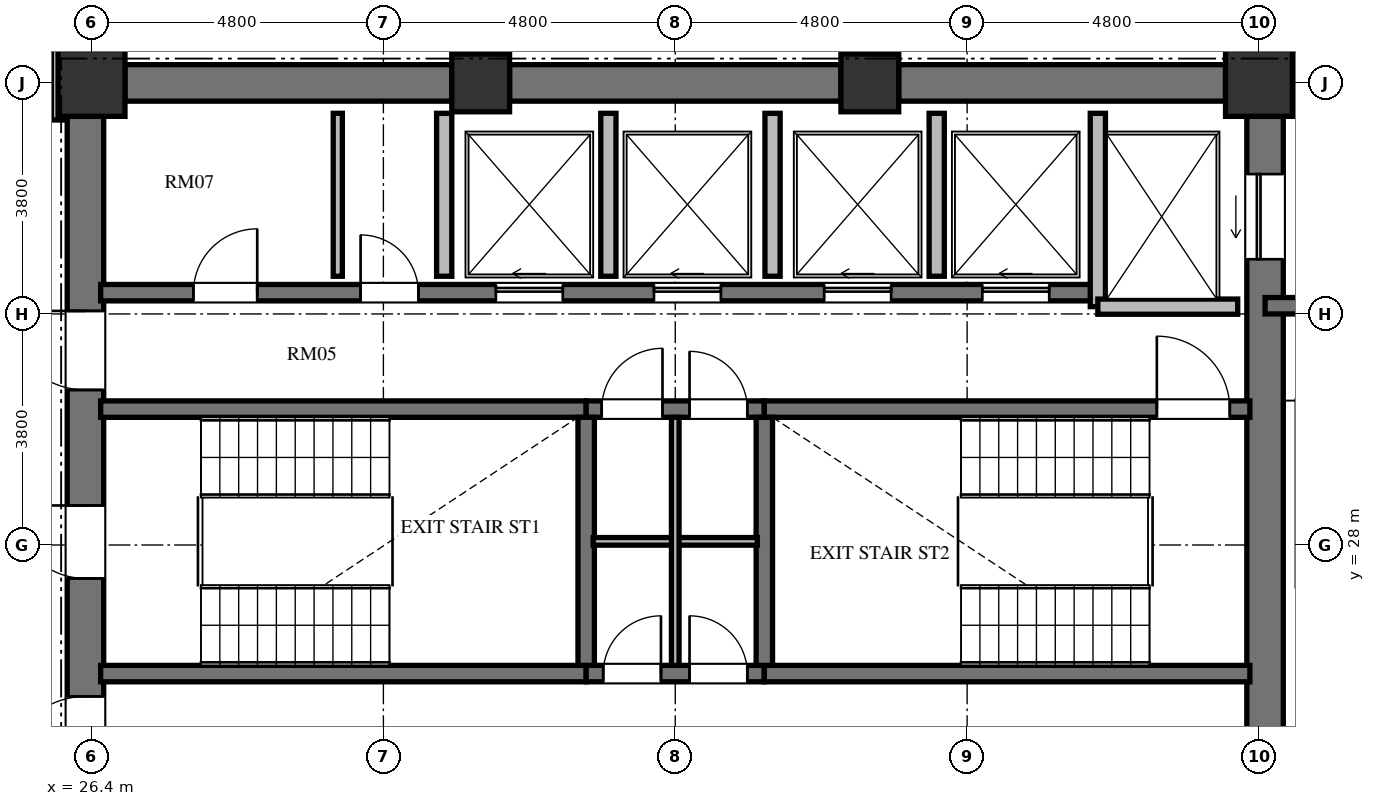
"""IFC4 building model, lengths in metres.
Left out: names, types, materials, properties, quantities, classifications, styles, units other than length and angle.
Written with IfcOpenShell. Run it as: python <this file> out.ifc"""

import sys

from ifc_helpers import new_model, si_unit, direction, frame, frame_2d, origin, origin_2d, place, context, subcontext, project, spatial, rectangle, extrude, element, fill, save


model = new_model("IFC4")
c1 = context("Model", 3, precision=1e-05, world=origin(), true_north=direction((0.0, 1.0)))
c2 = subcontext(c1, "Body", "Model", "MODEL_VIEW")
j1 = project(units=[si_unit("LENGTHUNIT", "METRE"), si_unit("PLANEANGLEUNIT", "RADIAN")], contexts=[c1])
p1 = place(None, origin())
s1 = spatial("IfcSite", under=j1, at=p1, CompositionType="ELEMENT")
p2 = place(p1, origin())
s2 = spatial("IfcBuilding", under=s1, at=p2, CompositionType="ELEMENT")
p3 = place(p2, frame((0.0, 0.0, 185.712)))
s3 = spatial("IfcBuildingStorey", under=s2, at=p3, CompositionType="ELEMENT", Elevation=185.712)
p4 = place(p3, frame((45.6, 35.6, 0.0), z_axis=(0.0, 0.0, 1.0), x_axis=(1.0, 0.0, 0.0)))
e1 = element("IfcColumn", 1, at=p4, inside=s3, PredefinedType="COLUMN", context=c2, shape_type="SweptSolid", body=[
    extrude(rectangle(XDim=1.1, YDim=1.1, at=origin_2d()), origin(), (0.0, 0.0, 1.0), 3.648),
])
for number, where, z_axis, x_axis in (
    (2, (39.2, 35.6, 0.0), (0.0, 0.0, 1.0), (1.0, 0.0, 0.0)),
    (3, (32.8, 35.6, 0.0), (0.0, 0.0, 1.0), (1.0, 0.0, 0.0)),
):
    element("IfcColumn", number, at=place(p3, frame(where, z_axis=z_axis, x_axis=x_axis)), inside=s3, PredefinedType="COLUMN", context=c2, shape_type="SweptSolid", body=[
        extrude(rectangle(XDim=0.95, YDim=0.95, at=origin_2d()), origin(), (0.0, 0.0, 1.0), 3.648),
    ])
p5 = place(p3, frame((26.4, 35.6, 0.0), z_axis=(0.0, 0.0, 1.0), x_axis=(1.0, 0.0, 0.0)))
e4 = element("IfcColumn", 4, at=p5, inside=s3, PredefinedType="COLUMN", context=c2, shape_type="SweptSolid", body=[
    extrude(rectangle(XDim=1.1, YDim=1.1, at=origin_2d()), origin(), (0.0, 0.0, 1.0), 3.648),
])
p6 = place(p3, frame((26.3, 20.95, 0.0), z_axis=(0.0, 0.0, 1.0), x_axis=(0.0, 1.0, 0.0)))
e5 = element("IfcWall", 5, at=p6, inside=s3, PredefinedType="SHEAR", context=c2, shape_type="SweptSolid", body=[
    extrude(rectangle(XDim=14.1, YDim=0.6, at=frame_2d((7.05, 0.0))), origin(), (0.0, 0.0, 1.0), 3.648),
])
p7 = place(p6, frame((6.5, 0.0, 0.0)))
e6 = element("IfcOpeningElement", 6, at=p7, cuts=e5, PredefinedType="OPENING", context=c2, shape_type="SweptSolid", body=[
    extrude(rectangle(XDim=1.2, YDim=2.15, at=frame_2d((0.6, 1.075))), frame((0.0, 0.31, 0.0), z_axis=(0.0, -1.0, 0.0), x_axis=(1.0, 0.0, 0.0)), (0.0, 0.0, 1.0), 0.62),
])
p8 = place(p6, frame((9.6, 0.0, 0.0)))
e7 = element("IfcOpeningElement", 7, at=p8, cuts=e5, PredefinedType="OPENING", context=c2, shape_type="SweptSolid", body=[
    extrude(rectangle(XDim=1.3, YDim=2.2, at=frame_2d((0.65, 1.1))), frame((0.0, 0.31, 0.0), z_axis=(0.0, -1.0, 0.0), x_axis=(1.0, 0.0, 0.0)), (0.0, 0.0, 1.0), 0.62),
])
p9 = place(p6, frame((3.26, 0.0, 0.0)))
e8 = element("IfcOpeningElement", 8, at=p9, cuts=e5, PredefinedType="OPENING", context=c2, shape_type="SweptSolid", body=[
    extrude(rectangle(XDim=1.3, YDim=2.2, at=frame_2d((0.65, 1.1))), frame((0.0, 0.31, 0.0), z_axis=(0.0, -1.0, 0.0), x_axis=(1.0, 0.0, 0.0)), (0.0, 0.0, 1.0), 0.62),
])
p10 = place(p3, frame((45.7, 20.95, 0.0), z_axis=(0.0, 0.0, 1.0), x_axis=(0.0, 1.0, 0.0)))
e9 = element("IfcWall", 9, at=p10, inside=s3, PredefinedType="SHEAR", context=c2, shape_type="SweptSolid", body=[
    extrude(rectangle(XDim=14.1, YDim=0.6, at=frame_2d((7.05, 0.0))), origin(), (0.0, 0.0, 1.0), 3.648),
])
p11 = place(p10, frame((11.75, 0.0, 0.0)))
e10 = element("IfcOpeningElement", 10, at=p11, cuts=e9, PredefinedType="OPENING", context=c2, shape_type="SweptSolid", body=[
    extrude(rectangle(XDim=1.4, YDim=2.3, at=frame_2d((0.7, 1.15))), frame((0.0, 0.31, 0.0), z_axis=(0.0, -1.0, 0.0), x_axis=(1.0, 0.0, 0.0)), (0.0, 0.0, 1.0), 0.62),
])
p12 = place(p10, frame((0.95, 0.0, 0.0)))
e11 = element("IfcOpeningElement", 11, at=p12, cuts=e9, PredefinedType="OPENING", context=c2, shape_type="SweptSolid", body=[
    extrude(rectangle(XDim=1.4, YDim=2.3, at=frame_2d((0.7, 1.15))), frame((0.0, 0.31, 0.0), z_axis=(0.0, -1.0, 0.0), x_axis=(1.0, 0.0, 0.0)), (0.0, 0.0, 1.0), 0.62),
])
p13 = place(p3, frame((26.95, 35.6, 0.0), z_axis=(0.0, 0.0, 1.0), x_axis=(1.0, 0.0, 0.0)))
e12 = element("IfcWall", 12, at=p13, inside=s3, PredefinedType="SHEAR", context=c2, shape_type="SweptSolid", body=[
    extrude(rectangle(XDim=5.375, YDim=0.6, at=frame_2d((2.688, 0.0))), origin(), (0.0, 0.0, 1.0), 3.648),
])
p14 = place(p3, frame((33.275, 35.6, 0.0), z_axis=(0.0, 0.0, 1.0), x_axis=(1.0, 0.0, 0.0)))
e13 = element("IfcWall", 13, at=p14, inside=s3, PredefinedType="SHEAR", context=c2, shape_type="SweptSolid", body=[
    extrude(rectangle(XDim=5.45, YDim=0.6, at=frame_2d((2.725, 0.0))), origin(), (0.0, 0.0, 1.0), 3.648),
])
p15 = place(p3, frame((39.675, 35.6, 0.0), z_axis=(0.0, 0.0, 1.0), x_axis=(1.0, 0.0, 0.0)))
e14 = element("IfcWall", 14, at=p15, inside=s3, PredefinedType="SHEAR", context=c2, shape_type="SweptSolid", body=[
    extrude(rectangle(XDim=5.375, YDim=0.6, at=frame_2d((2.688, 0.0))), origin(), (0.0, 0.0, 1.0), 3.648),
])
p16 = place(p3, frame((26.55, 30.235, 0.0), z_axis=(0.0, 0.0, 1.0), x_axis=(1.0, 0.0, 0.0)))
e15 = element("IfcWall", 15, at=p16, inside=s3, PredefinedType="SHEAR", context=c2, shape_type="SweptSolid", body=[
    extrude(rectangle(XDim=7.985, YDim=0.27, at=frame_2d((3.992, 0.0))), origin(), (0.0, 0.0, 1.0), 3.648),
])
p17 = place(p3, frame((34.535, 30.235, 0.0), z_axis=(0.0, 0.0, 1.0), x_axis=(1.0, 0.0, 0.0)))
e16 = element("IfcWall", 16, at=p17, inside=s3, PredefinedType="SHEAR", context=c2, shape_type="SweptSolid", body=[
    extrude(rectangle(XDim=2.93, YDim=0.27, at=frame_2d((1.465, 0.0))), origin(), (0.0, 0.0, 1.0), 3.648),
])
p18 = place(p17, frame((0.255, 0.0, 0.0)))
e17 = element("IfcOpeningElement", 17, at=p18, cuts=e16, PredefinedType="OPENING", context=c2, shape_type="SweptSolid", body=[
    extrude(rectangle(XDim=1.0, YDim=2.1, at=frame_2d((0.5, 1.05))), frame((0.0, 0.145, 0.0), z_axis=(0.0, -1.0, 0.0), x_axis=(1.0, 0.0, 0.0)), (0.0, 0.0, 1.0), 0.29),
])
p19 = place(p17, frame((1.7, 0.0, 0.0)))
e18 = element("IfcOpeningElement", 18, at=p19, cuts=e16, PredefinedType="OPENING", context=c2, shape_type="SweptSolid", body=[
    extrude(rectangle(XDim=0.95, YDim=2.1, at=frame_2d((0.475, 1.05))), frame((0.0, 0.145, 0.0), z_axis=(0.0, -1.0, 0.0), x_axis=(1.0, 0.0, 0.0)), (0.0, 0.0, 1.0), 0.29),
])
p20 = place(p3, frame((37.465, 30.235, 0.0), z_axis=(0.0, 0.0, 1.0), x_axis=(1.0, 0.0, 0.0)))
e19 = element("IfcWall", 19, at=p20, inside=s3, PredefinedType="SHEAR", context=c2, shape_type="SweptSolid", body=[
    extrude(rectangle(XDim=7.985, YDim=0.27, at=frame_2d((3.992, 0.0))), origin(), (0.0, 0.0, 1.0), 3.648),
])
p21 = place(p20, frame((6.455, 0.0, 0.0)))
e20 = element("IfcOpeningElement", 20, at=p21, cuts=e19, PredefinedType="OPENING", context=c2, shape_type="SweptSolid", body=[
    extrude(rectangle(XDim=1.2, YDim=2.15, at=frame_2d((0.6, 1.075))), frame((0.0, 0.145, 0.0), z_axis=(0.0, -1.0, 0.0), x_axis=(1.0, 0.0, 0.0)), (0.0, 0.0, 1.0), 0.29),
])
p22 = place(p3, frame((26.55, 25.885, 0.0), z_axis=(0.0, 0.0, 1.0), x_axis=(1.0, 0.0, 0.0)))
e21 = element("IfcWall", 21, at=p22, inside=s3, PredefinedType="SHEAR", context=c2, shape_type="SweptSolid", body=[
    extrude(rectangle(XDim=7.985, YDim=0.27, at=frame_2d((3.992, 0.0))), origin(), (0.0, 0.0, 1.0), 3.648),
])
p23 = place(p3, frame((34.535, 25.885, 0.0), z_axis=(0.0, 0.0, 1.0), x_axis=(1.0, 0.0, 0.0)))
e22 = element("IfcWall", 22, at=p23, inside=s3, PredefinedType="SHEAR", context=c2, shape_type="SweptSolid", body=[
    extrude(rectangle(XDim=2.93, YDim=0.27, at=frame_2d((1.465, 0.0))), origin(), (0.0, 0.0, 1.0), 3.648),
])
p24 = place(p23, frame((0.28, 0.0, 0.0)))
e23 = element("IfcOpeningElement", 23, at=p24, cuts=e22, PredefinedType="OPENING", context=c2, shape_type="SweptSolid", body=[
    extrude(rectangle(XDim=0.95, YDim=2.1, at=frame_2d((0.475, 1.05))), frame((0.0, 0.145, 0.0), z_axis=(0.0, -1.0, 0.0), x_axis=(1.0, 0.0, 0.0)), (0.0, 0.0, 1.0), 0.29),
])
p25 = place(p23, frame((1.7, 0.0, 0.0)))
e24 = element("IfcOpeningElement", 24, at=p25, cuts=e22, PredefinedType="OPENING", context=c2, shape_type="SweptSolid", body=[
    extrude(rectangle(XDim=0.95, YDim=2.1, at=frame_2d((0.475, 1.05))), frame((0.0, 0.145, 0.0), z_axis=(0.0, -1.0, 0.0), x_axis=(1.0, 0.0, 0.0)), (0.0, 0.0, 1.0), 0.29),
])
p26 = place(p3, frame((37.465, 25.885, 0.0), z_axis=(0.0, 0.0, 1.0), x_axis=(1.0, 0.0, 0.0)))
e25 = element("IfcWall", 25, at=p26, inside=s3, PredefinedType="SHEAR", context=c2, shape_type="SweptSolid", body=[
    extrude(rectangle(XDim=7.985, YDim=0.27, at=frame_2d((3.992, 0.0))), origin(), (0.0, 0.0, 1.0), 3.648),
])
for number, where, z_axis, x_axis in (
    (26, (34.535, 26.02, 0.0), (0.0, 0.0, 1.0), (0.0, 1.0, 0.0)),
    (27, (37.465, 26.02, 0.0), (0.0, 0.0, 1.0), (0.0, 1.0, 0.0)),
):
    element("IfcWall", number, at=place(p3, frame(where, z_axis=z_axis, x_axis=x_axis)), inside=s3, PredefinedType="SHEAR", context=c2, shape_type="SweptSolid", body=[
        extrude(rectangle(XDim=4.08, YDim=0.27, at=frame_2d((2.04, 0.0))), origin(), (0.0, 0.0, 1.0), 3.648),
    ])
p27 = place(p3, frame((34.65, 28.06, 0.0), z_axis=(0.0, 0.0, 1.0), x_axis=(1.0, 0.0, 0.0)))
e28 = element("IfcWall", 28, at=p27, inside=s3, PredefinedType="PARTITIONING", context=c2, shape_type="SweptSolid", body=[
    extrude(rectangle(XDim=2.7, YDim=0.125, at=frame_2d((1.35, 0.0))), origin(), (0.0, 0.0, 1.0), 3.198),
])
p28 = place(p3, frame((36.0, 26.02, 0.0), z_axis=(0.0, 0.0, 1.0), x_axis=(0.0, 1.0, 0.0)))
e29 = element("IfcWall", 29, at=p28, inside=s3, PredefinedType="PARTITIONING", context=c2, shape_type="SweptSolid", body=[
    extrude(rectangle(XDim=4.08, YDim=0.125, at=frame_2d((2.04, 0.0))), origin(), (0.0, 0.0, 1.0), 3.198),
])
p29 = place(p3, frame((26.55, 32.15, 0.0), z_axis=(0.0, 0.0, 1.0), x_axis=(1.0, 0.0, 0.0)))
e30 = element("IfcWall", 30, at=p29, inside=s3, PredefinedType="SHEAR", context=c2, shape_type="SweptSolid", body=[
    extrude(rectangle(XDim=16.4, YDim=0.27, at=frame_2d((8.2, 0.0))), origin(), (0.0, 0.0, 1.0), 3.648),
])
p30 = place(p29, frame((1.525, 0.0, 0.0)))
e31 = element("IfcOpeningElement", 31, at=p30, cuts=e30, PredefinedType="OPENING", context=c2, shape_type="SweptSolid", body=[
    extrude(rectangle(XDim=1.05, YDim=2.15, at=frame_2d((0.525, 1.075))), frame((0.0, 0.145, 0.0), z_axis=(0.0, -1.0, 0.0), x_axis=(1.0, 0.0, 0.0)), (0.0, 0.0, 1.0), 0.29),
])
p31 = place(p29, frame((4.275, 0.0, 0.0)))
e32 = element("IfcOpeningElement", 32, at=p31, cuts=e30, PredefinedType="OPENING", context=c2, shape_type="SweptSolid", body=[
    extrude(rectangle(XDim=0.95, YDim=2.1, at=frame_2d((0.475, 1.05))), frame((0.0, 0.145, 0.0), z_axis=(0.0, -1.0, 0.0), x_axis=(1.0, 0.0, 0.0)), (0.0, 0.0, 1.0), 0.29),
])
p32 = place(p29, frame((6.5, 0.0, 0.0)))
e33 = element("IfcOpeningElement", 33, at=p32, cuts=e30, PredefinedType="OPENING", context=c2, shape_type="SweptSolid", body=[
    extrude(rectangle(XDim=1.1, YDim=2.2, at=frame_2d((0.55, 1.1))), frame((0.0, 0.145, 0.0), z_axis=(0.0, -1.0, 0.0), x_axis=(1.0, 0.0, 0.0)), (0.0, 0.0, 1.0), 0.29),
])
p33 = place(p29, frame((9.1, 0.0, 0.0)))
e34 = element("IfcOpeningElement", 34, at=p33, cuts=e30, PredefinedType="OPENING", context=c2, shape_type="SweptSolid", body=[
    extrude(rectangle(XDim=1.1, YDim=2.2, at=frame_2d((0.55, 1.1))), frame((0.0, 0.145, 0.0), z_axis=(0.0, -1.0, 0.0), x_axis=(1.0, 0.0, 0.0)), (0.0, 0.0, 1.0), 0.29),
])
p34 = place(p29, frame((11.9, 0.0, 0.0)))
e35 = element("IfcOpeningElement", 35, at=p34, cuts=e30, PredefinedType="OPENING", context=c2, shape_type="SweptSolid", body=[
    extrude(rectangle(XDim=1.1, YDim=2.2, at=frame_2d((0.55, 1.1))), frame((0.0, 0.145, 0.0), z_axis=(0.0, -1.0, 0.0), x_axis=(1.0, 0.0, 0.0)), (0.0, 0.0, 1.0), 0.29),
])
p35 = place(p29, frame((14.5, 0.0, 0.0)))
e36 = element("IfcOpeningElement", 36, at=p35, cuts=e30, PredefinedType="OPENING", context=c2, shape_type="SweptSolid", body=[
    extrude(rectangle(XDim=1.1, YDim=2.2, at=frame_2d((0.55, 1.1))), frame((0.0, 0.145, 0.0), z_axis=(0.0, -1.0, 0.0), x_axis=(1.0, 0.0, 0.0)), (0.0, 0.0, 1.0), 0.29),
])
p36 = place(p3, frame((42.95, 31.92, 0.0), z_axis=(0.0, 0.0, 1.0), x_axis=(0.0, 1.0, 0.0)))
e37 = element("IfcWall", 37, at=p36, inside=s3, PredefinedType="SOLIDWALL", context=c2, shape_type="SweptSolid", body=[
    extrude(rectangle(XDim=3.18, YDim=0.25, at=frame_2d((1.59, 0.0))), origin(), (0.0, 0.0, 1.0), 3.198),
])
p37 = place(p3, frame((42.95, 31.92, 0.0), z_axis=(0.0, 0.0, 1.0), x_axis=(1.0, 0.0, 0.0)))
e38 = element("IfcWall", 38, at=p37, inside=s3, PredefinedType="SOLIDWALL", context=c2, shape_type="SweptSolid", body=[
    extrude(rectangle(XDim=2.3, YDim=0.25, at=frame_2d((1.15, 0.0))), origin(), (0.0, 0.0, 1.0), 3.198),
])
for number, where, z_axis, x_axis in (
    (39, (32.2, 32.42, 0.0), (0.0, 0.0, 1.0), (0.0, 1.0, 0.0)),
    (40, (34.9, 32.42, 0.0), (0.0, 0.0, 1.0), (0.0, 1.0, 0.0)),
    (41, (37.6, 32.42, 0.0), (0.0, 0.0, 1.0), (0.0, 1.0, 0.0)),
    (42, (40.3, 32.42, 0.0), (0.0, 0.0, 1.0), (0.0, 1.0, 0.0)),
):
    element("IfcWall", number, at=place(p3, frame(where, z_axis=z_axis, x_axis=x_axis)), inside=s3, PredefinedType="SOLIDWALL", context=c2, shape_type="SweptSolid", body=[
        extrude(rectangle(XDim=2.68, YDim=0.25, at=frame_2d((1.34, 0.0))), origin(), (0.0, 0.0, 1.0), 3.198),
    ])
p38 = place(p3, frame((30.45, 32.42, 0.0), z_axis=(0.0, 0.0, 1.0), x_axis=(0.0, 1.0, 0.0)))
e43 = element("IfcWall", 43, at=p38, inside=s3, PredefinedType="PARTITIONING", context=c2, shape_type="SweptSolid", body=[
    extrude(rectangle(XDim=2.68, YDim=0.15, at=frame_2d((1.34, 0.0))), origin(), (0.0, 0.0, 1.0), 3.198),
])
p39 = place(p3, frame((46.0, 35.98, 0.0), z_axis=(0.0, 0.0, 1.0), x_axis=(1.0, 0.0, 0.0)))
e44 = element("IfcWall", 44, at=p39, inside=s3, PredefinedType="SHEAR", context=c2, shape_type="SweptSolid", body=[
    extrude(rectangle(XDim=4.55, YDim=0.27, at=frame_2d((2.275, 0.0))), origin(), (0.0, 0.0, 1.0), 3.648),
])
p40 = place(p3, frame((45.7, 31.935, 0.0), z_axis=(0.0, 0.0, 1.0), x_axis=(1.0, 0.0, 0.0)))
e45 = element("IfcWall", 45, at=p40, inside=s3, PredefinedType="SHEAR", context=c2, shape_type="SweptSolid", body=[
    extrude(rectangle(XDim=4.715, YDim=0.27, at=frame_2d((2.357, 0.0))), origin(), (0.0, 0.0, 1.0), 3.648),
])
p41 = place(p3, frame((25.83, 36.21, 0.0), z_axis=(0.0, 0.0, 1.0), x_axis=(0.0, -1.0, 0.0)))
e46 = element("IfcWall", 46, at=p41, inside=s3, PredefinedType="PARTITIONING", context=c2, shape_type="SweptSolid", body=[
    extrude(rectangle(XDim=1.22, YDim=0.18, at=frame_2d((0.61, 0.0))), origin(), (0.0, 0.0, 1.0), 3.198),
])
p42 = place(p7, origin())
e47 = element("IfcDoor", 47, at=p42, inside=s3, OperationType="SINGLE_SWING_RIGHT", PredefinedType="DOOR", context=c2, shape_type="SweptSolid", body=[
    extrude(rectangle(XDim=1.2, YDim=2.15, at=frame_2d((0.6, 1.075))), frame((0.0, 0.025, 0.0), z_axis=(0.0, -1.0, 0.0), x_axis=(1.0, 0.0, 0.0)), (0.0, 0.0, 1.0), 0.05),
])
fill(e6, e47)
p43 = place(p21, origin())
e48 = element("IfcDoor", 48, at=p43, inside=s3, OperationType="SINGLE_SWING_LEFT", PredefinedType="DOOR", context=c2, shape_type="SweptSolid", body=[
    extrude(rectangle(XDim=1.2, YDim=2.15, at=frame_2d((0.6, 1.075))), frame((0.0, 0.025, 0.0), z_axis=(0.0, -1.0, 0.0), x_axis=(1.0, 0.0, 0.0)), (0.0, 0.0, 1.0), 0.05),
])
fill(e20, e48)
p44 = place(p24, origin())
e49 = element("IfcDoor", 49, at=p44, inside=s3, OperationType="SINGLE_SWING_RIGHT", PredefinedType="DOOR", context=c2, shape_type="SweptSolid", body=[
    extrude(rectangle(XDim=0.95, YDim=2.1, at=frame_2d((0.475, 1.05))), frame((0.0, 0.025, 0.0), z_axis=(0.0, -1.0, 0.0), x_axis=(1.0, 0.0, 0.0)), (0.0, 0.0, 1.0), 0.05),
])
fill(e23, e49)
p45 = place(p25, origin())
e50 = element("IfcDoor", 50, at=p45, inside=s3, OperationType="SINGLE_SWING_LEFT", PredefinedType="DOOR", context=c2, shape_type="SweptSolid", body=[
    extrude(rectangle(XDim=0.95, YDim=2.1, at=frame_2d((0.475, 1.05))), frame((0.0, 0.025, 0.0), z_axis=(0.0, -1.0, 0.0), x_axis=(1.0, 0.0, 0.0)), (0.0, 0.0, 1.0), 0.05),
])
fill(e24, e50)
p46 = place(p18, origin())
e51 = element("IfcDoor", 51, at=p46, inside=s3, OperationType="SINGLE_SWING_RIGHT", PredefinedType="DOOR", context=c2, shape_type="SweptSolid", body=[
    extrude(rectangle(XDim=1.0, YDim=2.1, at=frame_2d((0.5, 1.05))), frame((0.0, 0.025, 0.0), z_axis=(0.0, -1.0, 0.0), x_axis=(1.0, 0.0, 0.0)), (0.0, 0.0, 1.0), 0.05),
])
fill(e17, e51)
p47 = place(p19, origin())
e52 = element("IfcDoor", 52, at=p47, inside=s3, OperationType="SINGLE_SWING_LEFT", PredefinedType="DOOR", context=c2, shape_type="SweptSolid", body=[
    extrude(rectangle(XDim=0.95, YDim=2.1, at=frame_2d((0.475, 1.05))), frame((0.0, 0.025, 0.0), z_axis=(0.0, -1.0, 0.0), x_axis=(1.0, 0.0, 0.0)), (0.0, 0.0, 1.0), 0.05),
])
fill(e18, e52)
p48 = place(p8, origin())
e53 = element("IfcDoor", 53, at=p48, inside=s3, OperationType="SINGLE_SWING_RIGHT", PredefinedType="DOOR", context=c2, shape_type="SweptSolid", body=[
    extrude(rectangle(XDim=1.3, YDim=2.2, at=frame_2d((0.65, 1.1))), frame((0.0, 0.025, 0.0), z_axis=(0.0, -1.0, 0.0), x_axis=(1.0, 0.0, 0.0)), (0.0, 0.0, 1.0), 0.05),
])
fill(e7, e53)
p49 = place(p9, origin())
e54 = element("IfcDoor", 54, at=p49, inside=s3, OperationType="SINGLE_SWING_LEFT", PredefinedType="DOOR", context=c2, shape_type="SweptSolid", body=[
    extrude(rectangle(XDim=1.3, YDim=2.2, at=frame_2d((0.65, 1.1))), frame((0.0, 0.025, 0.0), z_axis=(0.0, -1.0, 0.0), x_axis=(1.0, 0.0, 0.0)), (0.0, 0.0, 1.0), 0.05),
])
fill(e8, e54)
p50 = place(p30, origin())
e55 = element("IfcDoor", 55, at=p50, inside=s3, OperationType="SINGLE_SWING_RIGHT", PredefinedType="DOOR", context=c2, shape_type="SweptSolid", body=[
    extrude(rectangle(XDim=1.05, YDim=2.15, at=frame_2d((0.525, 1.075))), frame((0.0, 0.025, 0.0), z_axis=(0.0, -1.0, 0.0), x_axis=(1.0, 0.0, 0.0)), (0.0, 0.0, 1.0), 0.05),
])
fill(e31, e55)
p51 = place(p31, origin())
e56 = element("IfcDoor", 56, at=p51, inside=s3, OperationType="SINGLE_SWING_LEFT", PredefinedType="DOOR", context=c2, shape_type="SweptSolid", body=[
    extrude(rectangle(XDim=0.95, YDim=2.1, at=frame_2d((0.475, 1.05))), frame((0.0, 0.025, 0.0), z_axis=(0.0, -1.0, 0.0), x_axis=(1.0, 0.0, 0.0)), (0.0, 0.0, 1.0), 0.05),
])
fill(e32, e56)
p52 = place(p32, origin())
e57 = element("IfcDoor", 57, at=p52, inside=s3, OperationType="SLIDING_TO_LEFT", PredefinedType="DOOR", context=c2, shape_type="SweptSolid", body=[
    extrude(rectangle(XDim=1.1, YDim=2.2, at=frame_2d((0.55, 1.1))), frame((0.0, 0.025, 0.0), z_axis=(0.0, -1.0, 0.0), x_axis=(1.0, 0.0, 0.0)), (0.0, 0.0, 1.0), 0.05),
])
fill(e33, e57)
p53 = place(p33, origin())
e58 = element("IfcDoor", 58, at=p53, inside=s3, OperationType="SLIDING_TO_LEFT", PredefinedType="DOOR", context=c2, shape_type="SweptSolid", body=[
    extrude(rectangle(XDim=1.1, YDim=2.2, at=frame_2d((0.55, 1.1))), frame((0.0, 0.025, 0.0), z_axis=(0.0, -1.0, 0.0), x_axis=(1.0, 0.0, 0.0)), (0.0, 0.0, 1.0), 0.05),
])
fill(e34, e58)
p54 = place(p34, origin())
e59 = element("IfcDoor", 59, at=p54, inside=s3, OperationType="SLIDING_TO_LEFT", PredefinedType="DOOR", context=c2, shape_type="SweptSolid", body=[
    extrude(rectangle(XDim=1.1, YDim=2.2, at=frame_2d((0.55, 1.1))), frame((0.0, 0.025, 0.0), z_axis=(0.0, -1.0, 0.0), x_axis=(1.0, 0.0, 0.0)), (0.0, 0.0, 1.0), 0.05),
])
fill(e35, e59)
p55 = place(p35, origin())
e60 = element("IfcDoor", 60, at=p55, inside=s3, OperationType="SLIDING_TO_LEFT", PredefinedType="DOOR", context=c2, shape_type="SweptSolid", body=[
    extrude(rectangle(XDim=1.1, YDim=2.2, at=frame_2d((0.55, 1.1))), frame((0.0, 0.025, 0.0), z_axis=(0.0, -1.0, 0.0), x_axis=(1.0, 0.0, 0.0)), (0.0, 0.0, 1.0), 0.05),
])
fill(e36, e60)
p56 = place(p11, origin())
e61 = element("IfcDoor", 61, at=p56, inside=s3, OperationType="SLIDING_TO_LEFT", PredefinedType="DOOR", context=c2, shape_type="SweptSolid", body=[
    extrude(rectangle(XDim=1.4, YDim=2.3, at=frame_2d((0.7, 1.15))), frame((0.0, 0.025, 0.0), z_axis=(0.0, -1.0, 0.0), x_axis=(1.0, 0.0, 0.0)), (0.0, 0.0, 1.0), 0.05),
])
fill(e10, e61)
save(model, sys.argv[1])
